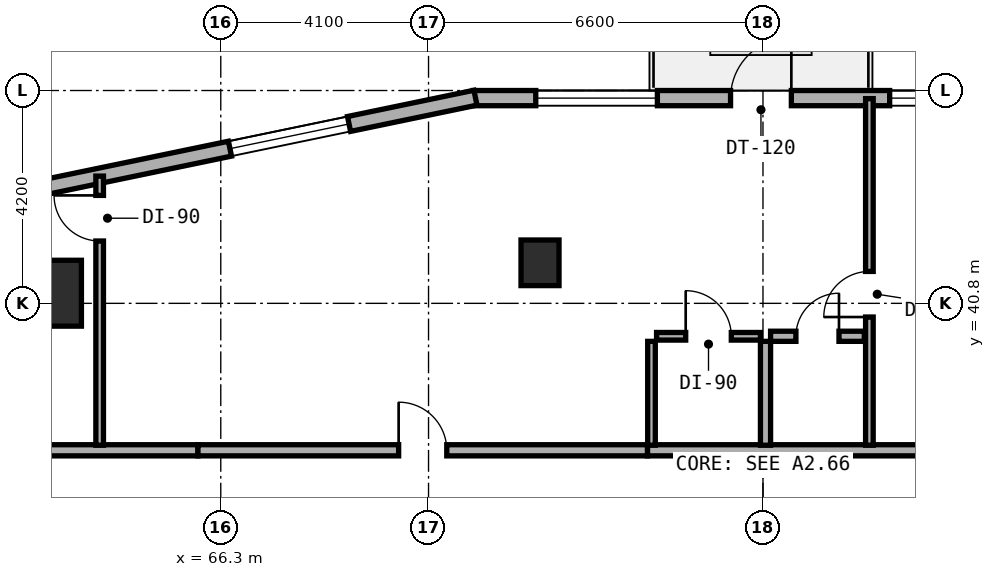
"""IFC4 building model, lengths in metres.
Left out: names, types, materials, properties, quantities, classifications, styles, units other than length and angle.
Written with IfcOpenShell. Run it as: python <this file> out.ifc"""

import sys

from ifc_helpers import new_model, si_unit, direction, frame, frame_2d, origin, origin_2d, place, context, subcontext, project, spatial, rectangle, extrude, element, fill, save


model = new_model("IFC4")
c1 = context("Model", 3, precision=1e-05, world=origin(), true_north=direction((0.0, 1.0)))
c2 = subcontext(c1, "Body", "Model", "MODEL_VIEW")
j1 = project(units=[si_unit("LENGTHUNIT", "METRE"), si_unit("PLANEANGLEUNIT", "RADIAN")], contexts=[c1])
p1 = place(None, origin())
s1 = spatial("IfcSite", under=j1, at=p1, CompositionType="ELEMENT")
p2 = place(p1, origin())
s2 = spatial("IfcBuilding", under=s1, at=p2, CompositionType="ELEMENT")
p3 = place(p2, frame((0.0, 0.0, 27.5)))
s3 = spatial("IfcBuildingStorey", under=s2, at=p3, CompositionType="ELEMENT", Elevation=27.5)
p4 = place(p3, frame((72.6, 41.6, 0.0), z_axis=(0.0, 0.0, 1.0), x_axis=(1.0, 0.0, 0.0)))
e1 = element("IfcColumn", 1, at=p4, inside=s3, PredefinedType="COLUMN", context=c2, shape_type="SweptSolid", body=[
    extrude(rectangle(XDim=0.75, YDim=0.9, at=origin_2d()), origin(), (0.0, 0.0, 1.0), 3.5),
])
p5 = place(p3, frame((63.0, 41.0, 0.0), z_axis=(0.0, 0.0, 1.0), x_axis=(1.0, 0.0, 0.0)))
e2 = element("IfcColumn", 2, at=p5, inside=s3, PredefinedType="COLUMN", context=c2, shape_type="SweptSolid", body=[
    extrude(rectangle(XDim=1.1, YDim=1.3, at=origin_2d()), origin(), (0.0, 0.0, 1.0), 3.5),
])
p6 = place(p3, frame((82.673, 44.85, 0.0), z_axis=(0.0, 0.0, 1.0), x_axis=(-1.0, 0.0, 0.0)))
e3 = element("IfcWall", 3, at=p6, inside=s3, PredefinedType="STANDARD", context=c2, shape_type="SweptSolid", body=[
    extrude(rectangle(XDim=11.391, YDim=0.3, at=frame_2d((5.696, 0.0))), origin(), (0.0, 0.0, 1.0), 3.25),
])
p7 = place(p6, frame((5.113, 0.0, 0.0)))
e4 = element("IfcOpeningElement", 4, at=p7, cuts=e3, PredefinedType="OPENING", context=c2, shape_type="SweptSolid", body=[
    extrude(rectangle(XDim=1.2, YDim=2.15, at=frame_2d((0.6, 1.075))), frame((0.0, 0.16, 0.0), z_axis=(0.0, -1.0, 0.0), x_axis=(1.0, 0.0, 0.0)), (0.0, 0.0, 1.0), 0.32),
])
p8 = place(p6, frame((1.673, 0.0, 0.85)))
e5 = element("IfcOpeningElement", 5, at=p8, cuts=e3, PredefinedType="OPENING", context=c2, shape_type="SweptSolid", body=[
    extrude(rectangle(XDim=1.5, YDim=1.5, at=frame_2d((0.75, 0.75))), frame((0.0, 0.16, 0.0), z_axis=(0.0, -1.0, 0.0), x_axis=(1.0, 0.0, 0.0)), (0.0, 0.0, 1.0), 0.32),
])
p9 = place(p6, frame((7.757, 0.0, 0.8)))
e6 = element("IfcOpeningElement", 6, at=p9, cuts=e3, PredefinedType="OPENING", context=c2, shape_type="SweptSolid", body=[
    extrude(rectangle(XDim=2.4, YDim=1.6, at=frame_2d((1.2, 0.8))), frame((0.0, 0.16, 0.0), z_axis=(0.0, -1.0, 0.0), x_axis=(1.0, 0.0, 0.0)), (0.0, 0.0, 1.0), 0.32),
])
p10 = place(p3, frame((71.326, 44.858, 0.0), z_axis=(0.0, 0.0, 1.0), x_axis=(-0.979124350489, -0.203262161453, 0.0)))
e7 = element("IfcWall", 7, at=p10, inside=s3, PredefinedType="STANDARD", context=c2, shape_type="SweptSolid", body=[
    extrude(rectangle(XDim=8.889, YDim=0.3, at=frame_2d((4.445, 0.0))), origin(), (0.0, 0.0, 1.0), 3.25),
])
p11 = place(p10, frame((2.548, 0.0, 0.8)))
e8 = element("IfcOpeningElement", 8, at=p11, cuts=e7, PredefinedType="OPENING", context=c2, shape_type="SweptSolid", body=[
    extrude(rectangle(XDim=2.4, YDim=1.6, at=frame_2d((1.2, 0.8))), frame((0.0, 0.16, 0.0), z_axis=(0.0, -1.0, 0.0), x_axis=(1.0, 0.0, 0.0)), (0.0, 0.0, 1.0), 0.32),
])
p12 = place(p3, frame((58.16, 37.9, 0.0), z_axis=(0.0, 0.0, 1.0), x_axis=(1.0, 0.0, 0.0)))
e9 = element("IfcWall", 9, at=p12, inside=s3, PredefinedType="SOLIDWALL", context=c2, shape_type="SweptSolid", body=[
    extrude(rectangle(XDim=7.69, YDim=0.22, at=frame_2d((3.845, 0.0))), origin(), (0.0, 0.0, 1.0), 2.865),
])
p13 = place(p3, frame((74.72, 37.9, 0.0), z_axis=(0.0, 0.0, 1.0), x_axis=(1.0, 0.0, 0.0)))
e10 = element("IfcWall", 10, at=p13, inside=s3, PredefinedType="SOLIDWALL", context=c2, shape_type="SweptSolid", body=[
    extrude(rectangle(XDim=6.68, YDim=0.22, at=frame_2d((3.34, 0.0))), origin(), (0.0, 0.0, 1.0), 2.725),
])
p14 = place(p3, frame((65.85, 37.9, 0.0), z_axis=(0.0, 0.0, 1.0), x_axis=(1.0, 0.0, 0.0)))
e11 = element("IfcWall", 11, at=p14, inside=s3, PredefinedType="SOLIDWALL", context=c2, shape_type="SweptSolid", body=[
    extrude(rectangle(XDim=8.87, YDim=0.22, at=frame_2d((4.435, 0.0))), origin(), (0.0, 0.0, 1.0), 2.725),
])
p15 = place(p14, frame((3.96, 0.0, 0.0)))
e12 = element("IfcOpeningElement", 12, at=p15, cuts=e11, PredefinedType="OPENING", context=c2, shape_type="SweptSolid", body=[
    extrude(rectangle(XDim=0.95, YDim=2.1, at=frame_2d((0.475, 1.05))), frame((0.0, 0.12, 0.0), z_axis=(0.0, -1.0, 0.0), x_axis=(1.0, 0.0, 0.0)), (0.0, 0.0, 1.0), 0.24),
])
p16 = place(p3, frame((63.91, 38.0, 0.0), z_axis=(0.0, 0.0, 1.0), x_axis=(0.0, 1.0, 0.0)))
e13 = element("IfcWall", 13, at=p16, inside=s3, PredefinedType="PARTITIONING", context=c2, shape_type="SweptSolid", body=[
    extrude(rectangle(XDim=5.311, YDim=0.15, at=frame_2d((2.656, 0.0))), origin(), (0.0, 0.0, 1.0), 2.865),
])
p17 = place(p16, frame((4.03, 0.0, 0.0)))
e14 = element("IfcOpeningElement", 14, at=p17, cuts=e13, PredefinedType="OPENING", context=c2, shape_type="SweptSolid", body=[
    extrude(rectangle(XDim=0.9, YDim=2.1, at=frame_2d((0.45, 1.05))), frame((0.0, 0.085, 0.0), z_axis=(0.0, -1.0, 0.0), x_axis=(1.0, 0.0, 0.0)), (0.0, 0.0, 1.0), 0.17),
])
p18 = place(p3, frame((79.1, 38.0, 0.0), z_axis=(0.0, 0.0, 1.0), x_axis=(0.0, 1.0, 0.0)))
e15 = element("IfcWall", 15, at=p18, inside=s3, PredefinedType="PARTITIONING", context=c2, shape_type="SweptSolid", body=[
    extrude(rectangle(XDim=6.84, YDim=0.15, at=frame_2d((3.42, 0.0))), origin(), (0.0, 0.0, 1.0), 2.775),
])
p19 = place(p18, frame((2.53, 0.0, 0.0)))
e16 = element("IfcOpeningElement", 16, at=p19, cuts=e15, PredefinedType="OPENING", context=c2, shape_type="SweptSolid", body=[
    extrude(rectangle(XDim=0.9, YDim=2.1, at=frame_2d((0.45, 1.05))), frame((0.0, 0.085, 0.0), z_axis=(0.0, -1.0, 0.0), x_axis=(1.0, 0.0, 0.0)), (0.0, 0.0, 1.0), 0.17),
])
p20 = place(p3, frame((77.05, 38.0, 0.0), z_axis=(0.0, 0.0, 1.0), x_axis=(0.0, 1.0, 0.0)))
e17 = element("IfcWall", 17, at=p20, inside=s3, PredefinedType="PLUMBINGWALL", context=c2, shape_type="SweptSolid", body=[
    extrude(rectangle(XDim=2.05, YDim=0.2, at=frame_2d((1.025, 0.0))), origin(), (0.0, 0.0, 1.0), 2.775),
])
p21 = place(p3, frame((74.8, 38.0, 0.0), z_axis=(0.0, 0.0, 1.0), x_axis=(0.0, 1.0, 0.0)))
e18 = element("IfcWall", 18, at=p21, inside=s3, PredefinedType="PARTITIONING", context=c2, shape_type="SweptSolid", body=[
    extrude(rectangle(XDim=2.05, YDim=0.15, at=frame_2d((1.025, 0.0))), origin(), (0.0, 0.0, 1.0), 2.775),
])
p22 = place(p3, frame((77.15, 40.15, 0.0), z_axis=(0.0, 0.0, 1.0), x_axis=(1.0, 0.0, 0.0)))
e19 = element("IfcWall", 19, at=p22, inside=s3, PredefinedType="PLUMBINGWALL", context=c2, shape_type="SweptSolid", body=[
    extrude(rectangle(XDim=1.85, YDim=0.2, at=frame_2d((0.925, 0.0))), origin(), (0.0, 0.0, 1.0), 3.22),
])
p23 = place(p22, frame((0.5, 0.0, 0.0)))
e20 = element("IfcOpeningElement", 20, at=p23, cuts=e19, PredefinedType="OPENING", context=c2, shape_type="SweptSolid", body=[
    extrude(rectangle(XDim=0.85, YDim=2.1, at=frame_2d((0.425, 1.05))), frame((0.0, 0.11, 0.0), z_axis=(0.0, -1.0, 0.0), x_axis=(1.0, 0.0, 0.0)), (0.0, 0.0, 1.0), 0.22),
])
p24 = place(p3, frame((74.9, 40.15, 0.0), z_axis=(0.0, 0.0, 1.0), x_axis=(1.0, 0.0, 0.0)))
e21 = element("IfcWall", 21, at=p24, inside=s3, PredefinedType="PARTITIONING", context=c2, shape_type="SweptSolid", body=[
    extrude(rectangle(XDim=2.05, YDim=0.15, at=frame_2d((1.025, 0.0))), origin(), (0.0, 0.0, 1.0), 3.22),
])
p25 = place(p24, frame((0.575, 0.0, 0.0)))
e22 = element("IfcOpeningElement", 22, at=p25, cuts=e21, PredefinedType="OPENING", context=c2, shape_type="SweptSolid", body=[
    extrude(rectangle(XDim=0.9, YDim=2.1, at=frame_2d((0.45, 1.05))), frame((0.0, 0.085, 0.0), z_axis=(0.0, -1.0, 0.0), x_axis=(1.0, 0.0, 0.0)), (0.0, 0.0, 1.0), 0.17),
])
p26 = place(p7, frame((1.2, 0.0, 0.0), z_axis=(0.0, 0.0, 1.0), x_axis=(-1.0, 0.0, 0.0)))
e23 = element("IfcDoor", 23, at=p26, inside=s3, OperationType="SINGLE_SWING_RIGHT", PredefinedType="DOOR", context=c2, shape_type="SweptSolid", body=[
    extrude(rectangle(XDim=1.2, YDim=2.15, at=frame_2d((0.6, 1.075))), frame((0.0, 0.025, 0.0), z_axis=(0.0, -1.0, 0.0), x_axis=(1.0, 0.0, 0.0)), (0.0, 0.0, 1.0), 0.05),
])
fill(e4, e23)
p27 = place(p8, origin())
e24 = element("IfcWindow", 24, at=p27, inside=s3, PartitioningType="SINGLE_PANEL", PredefinedType="WINDOW", context=c2, shape_type="SweptSolid", body=[
    extrude(rectangle(XDim=1.5, YDim=1.5, at=frame_2d((0.75, 0.75))), frame((0.0, 0.03, 0.0), z_axis=(0.0, -1.0, 0.0), x_axis=(1.0, 0.0, 0.0)), (0.0, 0.0, 1.0), 0.06),
])
fill(e5, e24)
p28 = place(p9, origin())
e25 = element("IfcWindow", 25, at=p28, inside=s3, PartitioningType="SINGLE_PANEL", PredefinedType="WINDOW", context=c2, shape_type="SweptSolid", body=[
    extrude(rectangle(XDim=2.4, YDim=1.6, at=frame_2d((1.2, 0.8))), frame((0.0, 0.03, 0.0), z_axis=(0.0, -1.0, 0.0), x_axis=(1.0, 0.0, 0.0)), (0.0, 0.0, 1.0), 0.06),
])
fill(e6, e25)
p29 = place(p11, origin())
e26 = element("IfcWindow", 26, at=p29, inside=s3, PartitioningType="SINGLE_PANEL", PredefinedType="WINDOW", context=c2, shape_type="SweptSolid", body=[
    extrude(rectangle(XDim=2.4, YDim=1.6, at=frame_2d((1.2, 0.8))), frame((0.0, 0.03, 0.0), z_axis=(0.0, -1.0, 0.0), x_axis=(1.0, 0.0, 0.0)), (0.0, 0.0, 1.0), 0.06),
])
fill(e8, e26)
p30 = place(p15, origin())
e27 = element("IfcDoor", 27, at=p30, inside=s3, OperationType="SINGLE_SWING_LEFT", PredefinedType="DOOR", context=c2, shape_type="SweptSolid", body=[
    extrude(rectangle(XDim=0.95, YDim=2.1, at=frame_2d((0.475, 1.05))), frame((0.0, 0.025, 0.0), z_axis=(0.0, -1.0, 0.0), x_axis=(1.0, 0.0, 0.0)), (0.0, 0.0, 1.0), 0.05),
])
fill(e12, e27)
p31 = place(p17, origin())
e28 = element("IfcDoor", 28, at=p31, inside=s3, OperationType="SINGLE_SWING_RIGHT", PredefinedType="DOOR", context=c2, shape_type="SweptSolid", body=[
    extrude(rectangle(XDim=0.9, YDim=2.1, at=frame_2d((0.45, 1.05))), frame((0.0, 0.025, 0.0), z_axis=(0.0, -1.0, 0.0), x_axis=(1.0, 0.0, 0.0)), (0.0, 0.0, 1.0), 0.05),
])
fill(e14, e28)
p32 = place(p19, origin())
e29 = element("IfcDoor", 29, at=p32, inside=s3, OperationType="SINGLE_SWING_LEFT", PredefinedType="DOOR", context=c2, shape_type="SweptSolid", body=[
    extrude(rectangle(XDim=0.9, YDim=2.1, at=frame_2d((0.45, 1.05))), frame((0.0, 0.025, 0.0), z_axis=(0.0, -1.0, 0.0), x_axis=(1.0, 0.0, 0.0)), (0.0, 0.0, 1.0), 0.05),
])
fill(e16, e29)
p33 = place(p23, origin())
e30 = element("IfcDoor", 30, at=p33, inside=s3, OperationType="SINGLE_SWING_RIGHT", PredefinedType="DOOR", context=c2, shape_type="SweptSolid", body=[
    extrude(rectangle(XDim=0.85, YDim=2.1, at=frame_2d((0.425, 1.05))), frame((0.0, 0.025, 0.0), z_axis=(0.0, -1.0, 0.0), x_axis=(1.0, 0.0, 0.0)), (0.0, 0.0, 1.0), 0.05),
])
fill(e20, e30)
p34 = place(p25, origin())
e31 = element("IfcDoor", 31, at=p34, inside=s3, OperationType="SINGLE_SWING_LEFT", PredefinedType="DOOR", context=c2, shape_type="SweptSolid", body=[
    extrude(rectangle(XDim=0.9, YDim=2.1, at=frame_2d((0.45, 1.05))), frame((0.0, 0.025, 0.0), z_axis=(0.0, -1.0, 0.0), x_axis=(1.0, 0.0, 0.0)), (0.0, 0.0, 1.0), 0.05),
])
fill(e22, e31)
save(model, sys.argv[1])
